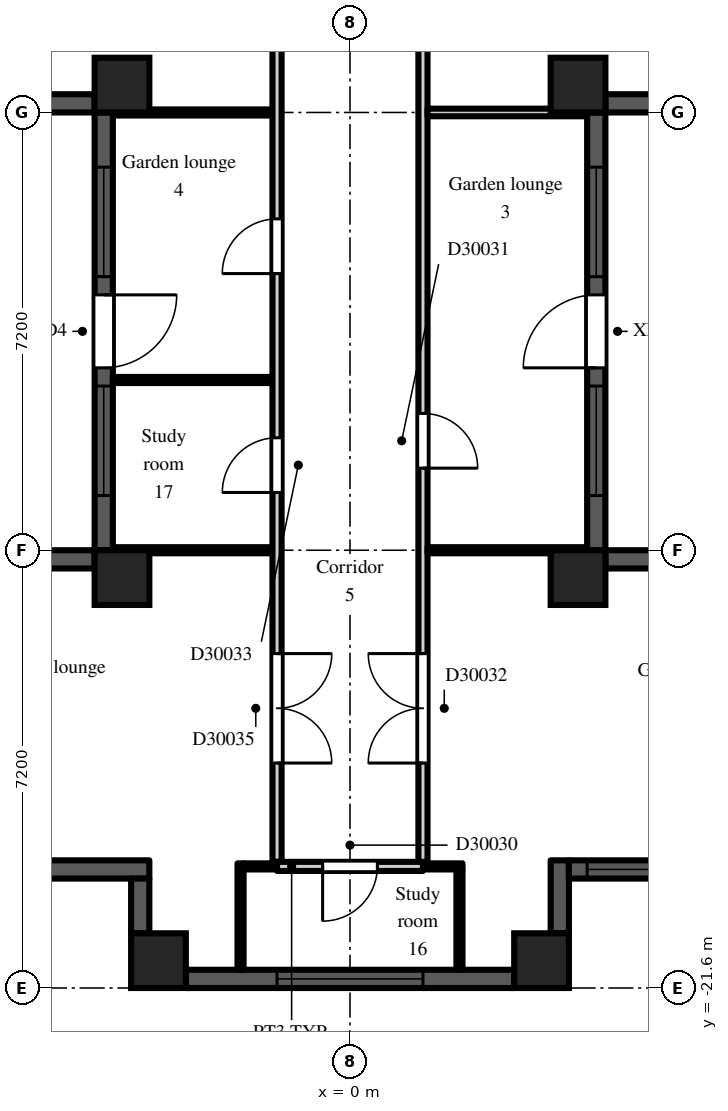
"""IFC4 building model, lengths in metres.
Left out: names, types, materials, properties, quantities, classifications, styles, units other than length and angle.
Written with IfcOpenShell. Run it as: python <this file> out.ifc"""

import sys

from ifc_helpers import new_model, si_unit, direction, frame, frame_2d, origin, origin_2d, place, context, subcontext, project, spatial, rectangle, extrude, element, fill, save


model = new_model("IFC4")
c1 = context("Model", 3, precision=1e-05, world=origin(), true_north=direction((0.0, 1.0)))
c2 = subcontext(c1, "Body", "Model", "MODEL_VIEW")
j1 = project(units=[si_unit("LENGTHUNIT", "METRE"), si_unit("PLANEANGLEUNIT", "RADIAN")], contexts=[c1])
p1 = place(None, origin())
s1 = spatial("IfcSite", under=j1, at=p1, CompositionType="ELEMENT")
p2 = place(p1, origin())
s2 = spatial("IfcBuilding", under=s1, at=p2, CompositionType="ELEMENT")
p3 = place(p2, frame((0.0, 0.0, 207.9)))
s3 = spatial("IfcBuildingStorey", under=s2, at=p3, CompositionType="ELEMENT", Elevation=207.9)
for number, where, z_axis, x_axis in (
    (1, (-3.75, -14.85, 0.0), (0.0, 0.0, 1.0), (1.0, 0.0, 0.0)),
    (2, (-3.75, -6.75, 0.0), (0.0, 0.0, 1.0), (1.0, 0.0, 0.0)),
    (3, (-3.15, -21.15, 0.0), (0.0, 0.0, 1.0), (1.0, 0.0, 0.0)),
    (4, (3.15, -21.15, 0.0), (0.0, 0.0, 1.0), (1.0, 0.0, 0.0)),
    (5, (3.75, -14.85, 0.0), (0.0, 0.0, 1.0), (1.0, 0.0, 0.0)),
    (6, (3.75, -6.75, 0.0), (0.0, 0.0, 1.0), (1.0, 0.0, 0.0)),
):
    element("IfcColumn", number, at=place(p3, frame(where, z_axis=z_axis, x_axis=x_axis)), inside=s3, PredefinedType="COLUMN", context=c2, shape_type="SweptSolid", body=[
        extrude(rectangle(XDim=0.9, YDim=0.9, at=origin_2d()), origin(), (0.0, 0.0, 1.0), 3.0),
    ])
p4 = place(p3, frame((-7.2, -7.05, 0.0), z_axis=(0.0, 0.0, 1.0), x_axis=(1.0, 0.0, 0.0)))
e7 = element("IfcWall", 7, at=p4, inside=s3, PredefinedType="SOLIDWALL", context=c2, shape_type="SweptSolid", body=[
    extrude(rectangle(XDim=3.0, YDim=0.3, at=frame_2d((1.5, 0.0))), origin(), (0.0, 0.0, 1.0), 2.3),
])
p5 = place(p3, frame((-4.05, -7.2, 0.0), z_axis=(0.0, 0.0, 1.0), x_axis=(0.0, -1.0, 0.0)))
e8 = element("IfcWall", 8, at=p5, inside=s3, PredefinedType="SOLIDWALL", context=c2, shape_type="SweptSolid", body=[
    extrude(rectangle(XDim=7.2, YDim=0.3, at=frame_2d((3.6, 0.0))), origin(), (0.0, 0.0, 1.0), 2.3),
])
p6 = place(p5, frame((3.0, 0.0, 0.0)))
e9 = element("IfcOpeningElement", 9, at=p6, cuts=e8, PredefinedType="OPENING", context=c2, shape_type="SweptSolid", body=[
    extrude(rectangle(XDim=1.2, YDim=2.05, at=frame_2d((0.6, 1.025))), frame((0.0, 0.16, 0.0), z_axis=(0.0, -1.0, 0.0), x_axis=(1.0, 0.0, 0.0)), (0.0, 0.0, 1.0), 0.32),
])
p7 = place(p5, frame((0.9, 0.0, 0.2)))
e10 = element("IfcOpeningElement", 10, at=p7, cuts=e8, PredefinedType="OPENING", context=c2, shape_type="SweptSolid", body=[
    extrude(rectangle(XDim=1.8, YDim=1.85, at=frame_2d((0.9, 0.925))), frame((0.0, 0.16, 0.0), z_axis=(0.0, -1.0, 0.0), x_axis=(1.0, 0.0, 0.0)), (0.0, 0.0, 1.0), 0.32),
])
p8 = place(p5, frame((4.5, 0.0, 0.2)))
e11 = element("IfcOpeningElement", 11, at=p8, cuts=e8, PredefinedType="OPENING", context=c2, shape_type="SweptSolid", body=[
    extrude(rectangle(XDim=1.8, YDim=1.85, at=frame_2d((0.9, 0.925))), frame((0.0, 0.16, 0.0), z_axis=(0.0, -1.0, 0.0), x_axis=(1.0, 0.0, 0.0)), (0.0, 0.0, 1.0), 0.32),
])
p9 = place(p3, frame((-4.2, -14.55, 0.0), z_axis=(0.0, 0.0, 1.0), x_axis=(-1.0, 0.0, 0.0)))
e12 = element("IfcWall", 12, at=p9, inside=s3, PredefinedType="SOLIDWALL", context=c2, shape_type="SweptSolid", body=[
    extrude(rectangle(XDim=2.1, YDim=0.3, at=frame_2d((1.05, 0.0))), origin(), (0.0, 0.0, 1.0), 2.3),
])
p10 = place(p3, frame((-5.1, -19.65, 0.0), z_axis=(0.0, 0.0, 1.0), x_axis=(1.0, 0.0, 0.0)))
e13 = element("IfcWall", 13, at=p10, inside=s3, PredefinedType="SOLIDWALL", context=c2, shape_type="SweptSolid", body=[
    extrude(rectangle(XDim=1.8, YDim=0.3, at=frame_2d((0.9, 0.0))), origin(), (0.0, 0.0, 1.0), 2.6),
])
p11 = place(p3, frame((-3.45, -19.8, 0.0), z_axis=(0.0, 0.0, 1.0), x_axis=(0.0, -1.0, 0.0)))
e14 = element("IfcWall", 14, at=p11, inside=s3, PredefinedType="SOLIDWALL", context=c2, shape_type="SweptSolid", body=[
    extrude(rectangle(XDim=0.9, YDim=0.3, at=frame_2d((0.45, 0.0))), origin(), (0.0, 0.0, 1.0), 2.6),
])
p12 = place(p3, frame((-2.7, -21.45, 0.0), z_axis=(0.0, 0.0, 1.0), x_axis=(1.0, 0.0, 0.0)))
e15 = element("IfcWall", 15, at=p12, inside=s3, PredefinedType="SOLIDWALL", context=c2, shape_type="SweptSolid", body=[
    extrude(rectangle(XDim=5.4, YDim=0.3, at=frame_2d((2.7, 0.0))), origin(), (0.0, 0.0, 1.0), 2.3),
])
p13 = place(p12, frame((1.5, 0.0, 0.2)))
e16 = element("IfcOpeningElement", 16, at=p13, cuts=e15, PredefinedType="OPENING", context=c2, shape_type="SweptSolid", body=[
    extrude(rectangle(XDim=2.4, YDim=1.85, at=frame_2d((1.2, 0.925))), frame((0.0, 0.16, 0.0), z_axis=(0.0, -1.0, 0.0), x_axis=(1.0, 0.0, 0.0)), (0.0, 0.0, 1.0), 0.32),
])
p14 = place(p3, frame((3.45, -20.7, 0.0), z_axis=(0.0, 0.0, 1.0), x_axis=(0.0, 1.0, 0.0)))
e17 = element("IfcWall", 17, at=p14, inside=s3, PredefinedType="SOLIDWALL", context=c2, shape_type="SweptSolid", body=[
    extrude(rectangle(XDim=1.2, YDim=0.3, at=frame_2d((0.6, 0.0))), origin(), (0.0, 0.0, 1.0), 2.6),
])
p15 = place(p3, frame((3.6, -19.65, 0.0), z_axis=(0.0, 0.0, 1.0), x_axis=(1.0, 0.0, 0.0)))
e18 = element("IfcWall", 18, at=p15, inside=s3, PredefinedType="SOLIDWALL", context=c2, shape_type="SweptSolid", body=[
    extrude(rectangle(XDim=1.8, YDim=0.3, at=frame_2d((0.9, 0.0))), origin(), (0.0, 0.0, 1.0), 2.6),
])
p16 = place(p15, frame((0.3, 0.0, 0.2)))
e19 = element("IfcOpeningElement", 19, at=p16, cuts=e18, PredefinedType="OPENING", context=c2, shape_type="SweptSolid", body=[
    extrude(rectangle(XDim=1.2, YDim=1.85, at=frame_2d((0.6, 0.925))), frame((0.0, 0.16, 0.0), z_axis=(0.0, -1.0, 0.0), x_axis=(1.0, 0.0, 0.0)), (0.0, 0.0, 1.0), 0.32),
])
p17 = place(p3, frame((6.3, -14.55, 0.0), z_axis=(0.0, 0.0, 1.0), x_axis=(-1.0, 0.0, 0.0)))
e20 = element("IfcWall", 20, at=p17, inside=s3, PredefinedType="SOLIDWALL", context=c2, shape_type="SweptSolid", body=[
    extrude(rectangle(XDim=2.1, YDim=0.3, at=frame_2d((1.05, 0.0))), origin(), (0.0, 0.0, 1.0), 2.3),
])
p18 = place(p3, frame((4.05, -14.4, 0.0), z_axis=(0.0, 0.0, 1.0), x_axis=(0.0, 1.0, 0.0)))
e21 = element("IfcWall", 21, at=p18, inside=s3, PredefinedType="SOLIDWALL", context=c2, shape_type="SweptSolid", body=[
    extrude(rectangle(XDim=7.2, YDim=0.3, at=frame_2d((3.6, 0.0))), origin(), (0.0, 0.0, 1.0), 2.3),
])
p19 = place(p18, frame((3.0, 0.0, 0.0)))
e22 = element("IfcOpeningElement", 22, at=p19, cuts=e21, PredefinedType="OPENING", context=c2, shape_type="SweptSolid", body=[
    extrude(rectangle(XDim=1.2, YDim=2.05, at=frame_2d((0.6, 1.025))), frame((0.0, 0.16, 0.0), z_axis=(0.0, -1.0, 0.0), x_axis=(1.0, 0.0, 0.0)), (0.0, 0.0, 1.0), 0.32),
])
p20 = place(p18, frame((0.9, 0.0, 0.2)))
e23 = element("IfcOpeningElement", 23, at=p20, cuts=e21, PredefinedType="OPENING", context=c2, shape_type="SweptSolid", body=[
    extrude(rectangle(XDim=1.8, YDim=1.85, at=frame_2d((0.9, 0.925))), frame((0.0, 0.16, 0.0), z_axis=(0.0, -1.0, 0.0), x_axis=(1.0, 0.0, 0.0)), (0.0, 0.0, 1.0), 0.32),
])
p21 = place(p18, frame((4.5, 0.0, 0.2)))
e24 = element("IfcOpeningElement", 24, at=p21, cuts=e21, PredefinedType="OPENING", context=c2, shape_type="SweptSolid", body=[
    extrude(rectangle(XDim=1.8, YDim=1.85, at=frame_2d((0.9, 0.925))), frame((0.0, 0.16, 0.0), z_axis=(0.0, -1.0, 0.0), x_axis=(1.0, 0.0, 0.0)), (0.0, 0.0, 1.0), 0.32),
])
p22 = place(p3, frame((4.2, -7.05, 0.0), z_axis=(0.0, 0.0, 1.0), x_axis=(1.0, 0.0, 0.0)))
e25 = element("IfcWall", 25, at=p22, inside=s3, PredefinedType="SOLIDWALL", context=c2, shape_type="SweptSolid", body=[
    extrude(rectangle(XDim=3.0, YDim=0.3, at=frame_2d((1.5, 0.0))), origin(), (0.0, 0.0, 1.0), 2.3),
])
for number, where, z_axis, x_axis in (
    (26, (-3.9, -14.4, 0.0), (0.0, 0.0, 1.0), (1.0, 0.0, 0.0)),
    (27, (-3.9, -11.6, 0.0), (0.0, 0.0, 1.0), (1.0, 0.0, 0.0)),
    (28, (-3.9, -7.2, 0.0), (0.0, 0.0, 1.0), (1.0, 0.0, 0.0)),
):
    element("IfcWall", number, at=place(p3, frame(where, z_axis=z_axis, x_axis=x_axis)), inside=s3, PredefinedType="PARTITIONING", context=c2, shape_type="SweptSolid", body=[
        extrude(rectangle(XDim=2.625, YDim=0.1, at=frame_2d((1.312, 0.0))), origin(), (0.0, 0.0, 1.0), 2.6),
    ])
p23 = place(p3, frame((-1.8, -21.3, 0.0), z_axis=(0.0, 0.0, 1.0), x_axis=(0.0, 1.0, 0.0)))
e29 = element("IfcWall", 29, at=p23, inside=s3, PredefinedType="PARTITIONING", context=c2, shape_type="SweptSolid", body=[
    extrude(rectangle(XDim=1.75, YDim=0.1, at=frame_2d((0.875, 0.0))), origin(), (0.0, 0.0, 1.0), 2.6),
])
p24 = place(p3, frame((-1.75, -19.6, 0.0), z_axis=(0.0, 0.0, 1.0), x_axis=(1.0, 0.0, 0.0)))
e30 = element("IfcWall", 30, at=p24, inside=s3, PredefinedType="PARTITIONING", context=c2, shape_type="SweptSolid", body=[
    extrude(rectangle(XDim=0.55, YDim=0.1, at=frame_2d((0.275, 0.0))), origin(), (0.0, 0.0, 1.0), 2.6),
])
p25 = place(p3, frame((-1.2, -19.525, 0.0), z_axis=(0.0, 0.0, 1.0), x_axis=(0.0, 1.0, 0.0)))
e31 = element("IfcWall", 31, at=p25, inside=s3, PredefinedType="PARTITIONING", context=c2, shape_type="SweptSolid", body=[
    extrude(rectangle(XDim=18.25, YDim=0.15, at=frame_2d((9.125, 0.0))), origin(), (0.0, 0.0, 1.0), 2.6),
])
p26 = place(p25, frame((6.075, 0.0, 0.0)))
e32 = element("IfcOpeningElement", 32, at=p26, cuts=e31, PredefinedType="OPENING", context=c2, shape_type="SweptSolid", body=[
    extrude(rectangle(XDim=0.9, YDim=2.1, at=frame_2d((0.45, 1.05))), frame((0.0, 0.085, 0.0), z_axis=(0.0, -1.0, 0.0), x_axis=(1.0, 0.0, 0.0)), (0.0, 0.0, 1.0), 0.17),
])
p27 = place(p25, frame((9.675, 0.0, 0.0)))
e33 = element("IfcOpeningElement", 33, at=p27, cuts=e31, PredefinedType="OPENING", context=c2, shape_type="SweptSolid", body=[
    extrude(rectangle(XDim=0.9, YDim=2.1, at=frame_2d((0.45, 1.05))), frame((0.0, 0.085, 0.0), z_axis=(0.0, -1.0, 0.0), x_axis=(1.0, 0.0, 0.0)), (0.0, 0.0, 1.0), 0.17),
])
p28 = place(p25, frame((1.625, 0.0, 0.0)))
e34 = element("IfcOpeningElement", 34, at=p28, cuts=e31, PredefinedType="OPENING", context=c2, shape_type="SweptSolid", body=[
    extrude(rectangle(XDim=1.8, YDim=2.1, at=frame_2d((0.9, 1.05))), frame((0.0, 0.085, 0.0), z_axis=(0.0, -1.0, 0.0), x_axis=(1.0, 0.0, 0.0)), (0.0, 0.0, 1.0), 0.17),
])
p29 = place(p3, frame((-1.2, -19.6, 0.0), z_axis=(0.0, 0.0, 1.0), x_axis=(1.0, 0.0, 0.0)))
e35 = element("IfcWall", 35, at=p29, inside=s3, PredefinedType="PARTITIONING", context=c2, shape_type="SweptSolid", body=[
    extrude(rectangle(XDim=2.4, YDim=0.15, at=frame_2d((1.2, 0.0))), origin(), (0.0, 0.0, 1.0), 2.6),
])
p30 = place(p29, frame((0.75, 0.0, 0.0)))
e36 = element("IfcOpeningElement", 36, at=p30, cuts=e35, PredefinedType="OPENING", context=c2, shape_type="SweptSolid", body=[
    extrude(rectangle(XDim=0.9, YDim=2.1, at=frame_2d((0.45, 1.05))), frame((0.0, 0.085, 0.0), z_axis=(0.0, -1.0, 0.0), x_axis=(1.0, 0.0, 0.0)), (0.0, 0.0, 1.0), 0.17),
])
p31 = place(p3, frame((1.2, -19.525, 0.0), z_axis=(0.0, 0.0, 1.0), x_axis=(0.0, 1.0, 0.0)))
e37 = element("IfcWall", 37, at=p31, inside=s3, PredefinedType="PARTITIONING", context=c2, shape_type="SweptSolid", body=[
    extrude(rectangle(XDim=18.4, YDim=0.15, at=frame_2d((9.2, 0.0))), origin(), (0.0, 0.0, 1.0), 2.6),
])
p32 = place(p31, frame((16.675, 0.0, 0.0)))
e38 = element("IfcOpeningElement", 38, at=p32, cuts=e37, PredefinedType="OPENING", context=c2, shape_type="SweptSolid", body=[
    extrude(rectangle(XDim=0.9, YDim=2.1, at=frame_2d((0.45, 1.05))), frame((0.0, 0.085, 0.0), z_axis=(0.0, -1.0, 0.0), x_axis=(1.0, 0.0, 0.0)), (0.0, 0.0, 1.0), 0.17),
])
p33 = place(p31, frame((13.675, 0.0, 0.0)))
e39 = element("IfcOpeningElement", 39, at=p33, cuts=e37, PredefinedType="OPENING", context=c2, shape_type="SweptSolid", body=[
    extrude(rectangle(XDim=0.9, YDim=2.1, at=frame_2d((0.45, 1.05))), frame((0.0, 0.085, 0.0), z_axis=(0.0, -1.0, 0.0), x_axis=(1.0, 0.0, 0.0)), (0.0, 0.0, 1.0), 0.17),
])
p34 = place(p31, frame((6.475, 0.0, 0.0)))
e40 = element("IfcOpeningElement", 40, at=p34, cuts=e37, PredefinedType="OPENING", context=c2, shape_type="SweptSolid", body=[
    extrude(rectangle(XDim=0.9, YDim=2.1, at=frame_2d((0.45, 1.05))), frame((0.0, 0.085, 0.0), z_axis=(0.0, -1.0, 0.0), x_axis=(1.0, 0.0, 0.0)), (0.0, 0.0, 1.0), 0.17),
])
p35 = place(p31, frame((1.625, 0.0, 0.0)))
e41 = element("IfcOpeningElement", 41, at=p35, cuts=e37, PredefinedType="OPENING", context=c2, shape_type="SweptSolid", body=[
    extrude(rectangle(XDim=1.8, YDim=2.1, at=frame_2d((0.9, 1.05))), frame((0.0, 0.085, 0.0), z_axis=(0.0, -1.0, 0.0), x_axis=(1.0, 0.0, 0.0)), (0.0, 0.0, 1.0), 0.17),
])
p36 = place(p3, frame((1.2, -19.6, 0.0), z_axis=(0.0, 0.0, 1.0), x_axis=(1.0, 0.0, 0.0)))
e42 = element("IfcWall", 42, at=p36, inside=s3, PredefinedType="PARTITIONING", context=c2, shape_type="SweptSolid", body=[
    extrude(rectangle(XDim=0.65, YDim=0.1, at=frame_2d((0.325, 0.0))), origin(), (0.0, 0.0, 1.0), 2.6),
])
p37 = place(p3, frame((1.275, -14.4, 0.0), z_axis=(0.0, 0.0, 1.0), x_axis=(1.0, 0.0, 0.0)))
e43 = element("IfcWall", 43, at=p37, inside=s3, PredefinedType="PARTITIONING", context=c2, shape_type="SweptSolid", body=[
    extrude(rectangle(XDim=2.625, YDim=0.1, at=frame_2d((1.312, 0.0))), origin(), (0.0, 0.0, 1.0), 2.6),
])
p38 = place(p3, frame((1.275, -7.2, 0.0), z_axis=(0.0, 0.0, 1.0), x_axis=(1.0, 0.0, 0.0)))
e44 = element("IfcWall", 44, at=p38, inside=s3, PredefinedType="PARTITIONING", context=c2, shape_type="SweptSolid", body=[
    extrude(rectangle(XDim=2.625, YDim=0.125, at=frame_2d((1.312, 0.0))), origin(), (0.0, 0.0, 1.0), 2.6),
])
p39 = place(p3, frame((1.8, -21.3, 0.0), z_axis=(0.0, 0.0, 1.0), x_axis=(0.0, 1.0, 0.0)))
e45 = element("IfcWall", 45, at=p39, inside=s3, PredefinedType="PARTITIONING", context=c2, shape_type="SweptSolid", body=[
    extrude(rectangle(XDim=1.65, YDim=0.1, at=frame_2d((0.825, 0.0))), origin(), (0.0, 0.0, 1.0), 2.6),
])
p40 = place(p6, origin())
e46 = element("IfcDoor", 46, at=p40, inside=s3, OperationType="SINGLE_SWING_LEFT", PredefinedType="DOOR", context=c2, shape_type="SweptSolid", body=[
    extrude(rectangle(XDim=1.2, YDim=2.05, at=frame_2d((0.6, 1.025))), frame((0.0, 0.025, 0.0), z_axis=(0.0, -1.0, 0.0), x_axis=(1.0, 0.0, 0.0)), (0.0, 0.0, 1.0), 0.05),
])
fill(e9, e46)
p41 = place(p7, origin())
e47 = element("IfcWindow", 47, at=p41, inside=s3, PartitioningType="SINGLE_PANEL", PredefinedType="WINDOW", context=c2, shape_type="SweptSolid", body=[
    extrude(rectangle(XDim=1.8, YDim=1.85, at=frame_2d((0.9, 0.925))), frame((0.0, 0.03, 0.0), z_axis=(0.0, -1.0, 0.0), x_axis=(1.0, 0.0, 0.0)), (0.0, 0.0, 1.0), 0.06),
])
fill(e10, e47)
p42 = place(p8, origin())
e48 = element("IfcWindow", 48, at=p42, inside=s3, PartitioningType="SINGLE_PANEL", PredefinedType="WINDOW", context=c2, shape_type="SweptSolid", body=[
    extrude(rectangle(XDim=1.8, YDim=1.85, at=frame_2d((0.9, 0.925))), frame((0.0, 0.03, 0.0), z_axis=(0.0, -1.0, 0.0), x_axis=(1.0, 0.0, 0.0)), (0.0, 0.0, 1.0), 0.06),
])
fill(e11, e48)
p43 = place(p13, origin())
e49 = element("IfcWindow", 49, at=p43, inside=s3, PartitioningType="SINGLE_PANEL", PredefinedType="WINDOW", context=c2, shape_type="SweptSolid", body=[
    extrude(rectangle(XDim=2.4, YDim=1.85, at=frame_2d((1.2, 0.925))), frame((0.0, 0.03, 0.0), z_axis=(0.0, -1.0, 0.0), x_axis=(1.0, 0.0, 0.0)), (0.0, 0.0, 1.0), 0.06),
])
fill(e16, e49)
p44 = place(p16, origin())
e50 = element("IfcWindow", 50, at=p44, inside=s3, PartitioningType="SINGLE_PANEL", PredefinedType="WINDOW", context=c2, shape_type="SweptSolid", body=[
    extrude(rectangle(XDim=1.2, YDim=1.85, at=frame_2d((0.6, 0.925))), frame((0.0, 0.03, 0.0), z_axis=(0.0, -1.0, 0.0), x_axis=(1.0, 0.0, 0.0)), (0.0, 0.0, 1.0), 0.06),
])
fill(e19, e50)
p45 = place(p19, origin())
e51 = element("IfcDoor", 51, at=p45, inside=s3, OperationType="SINGLE_SWING_LEFT", PredefinedType="DOOR", context=c2, shape_type="SweptSolid", body=[
    extrude(rectangle(XDim=1.2, YDim=2.05, at=frame_2d((0.6, 1.025))), frame((0.0, 0.025, 0.0), z_axis=(0.0, -1.0, 0.0), x_axis=(1.0, 0.0, 0.0)), (0.0, 0.0, 1.0), 0.05),
])
fill(e22, e51)
p46 = place(p20, origin())
e52 = element("IfcWindow", 52, at=p46, inside=s3, PartitioningType="SINGLE_PANEL", PredefinedType="WINDOW", context=c2, shape_type="SweptSolid", body=[
    extrude(rectangle(XDim=1.8, YDim=1.85, at=frame_2d((0.9, 0.925))), frame((0.0, 0.03, 0.0), z_axis=(0.0, -1.0, 0.0), x_axis=(1.0, 0.0, 0.0)), (0.0, 0.0, 1.0), 0.06),
])
fill(e23, e52)
p47 = place(p21, origin())
e53 = element("IfcWindow", 53, at=p47, inside=s3, PartitioningType="SINGLE_PANEL", PredefinedType="WINDOW", context=c2, shape_type="SweptSolid", body=[
    extrude(rectangle(XDim=1.8, YDim=1.85, at=frame_2d((0.9, 0.925))), frame((0.0, 0.03, 0.0), z_axis=(0.0, -1.0, 0.0), x_axis=(1.0, 0.0, 0.0)), (0.0, 0.0, 1.0), 0.06),
])
fill(e24, e53)
p48 = place(p30, frame((0.9, 0.0, 0.0), z_axis=(0.0, 0.0, 1.0), x_axis=(-1.0, 0.0, 0.0)))
e54 = element("IfcDoor", 54, at=p48, inside=s3, OperationType="SINGLE_SWING_RIGHT", PredefinedType="DOOR", context=c2, shape_type="SweptSolid", body=[
    extrude(rectangle(XDim=0.9, YDim=2.1, at=frame_2d((0.45, 1.05))), frame((0.0, 0.025, 0.0), z_axis=(0.0, -1.0, 0.0), x_axis=(1.0, 0.0, 0.0)), (0.0, 0.0, 1.0), 0.05),
])
fill(e36, e54)
p49 = place(p34, frame((0.9, 0.0, 0.0), z_axis=(0.0, 0.0, 1.0), x_axis=(-1.0, 0.0, 0.0)))
e55 = element("IfcDoor", 55, at=p49, inside=s3, OperationType="SINGLE_SWING_RIGHT", PredefinedType="DOOR", context=c2, shape_type="SweptSolid", body=[
    extrude(rectangle(XDim=0.9, YDim=2.1, at=frame_2d((0.45, 1.05))), frame((0.0, 0.025, 0.0), z_axis=(0.0, -1.0, 0.0), x_axis=(1.0, 0.0, 0.0)), (0.0, 0.0, 1.0), 0.05),
])
fill(e40, e55)
p50 = place(p35, origin())
e56 = element("IfcDoor", 56, at=p50, inside=s3, OperationType="DOUBLE_DOOR_DOUBLE_SWING", PredefinedType="DOOR", context=c2, shape_type="SweptSolid", body=[
    extrude(rectangle(XDim=1.8, YDim=2.1, at=frame_2d((0.9, 1.05))), frame((0.0, 0.025, 0.0), z_axis=(0.0, -1.0, 0.0), x_axis=(1.0, 0.0, 0.0)), (0.0, 0.0, 1.0), 0.05),
])
fill(e41, e56)
p51 = place(p26, origin())
e57 = element("IfcDoor", 57, at=p51, inside=s3, OperationType="SINGLE_SWING_LEFT", PredefinedType="DOOR", context=c2, shape_type="SweptSolid", body=[
    extrude(rectangle(XDim=0.9, YDim=2.1, at=frame_2d((0.45, 1.05))), frame((0.0, 0.025, 0.0), z_axis=(0.0, -1.0, 0.0), x_axis=(1.0, 0.0, 0.0)), (0.0, 0.0, 1.0), 0.05),
])
fill(e32, e57)
p52 = place(p27, origin())
e58 = element("IfcDoor", 58, at=p52, inside=s3, OperationType="SINGLE_SWING_LEFT", PredefinedType="DOOR", context=c2, shape_type="SweptSolid", body=[
    extrude(rectangle(XDim=0.9, YDim=2.1, at=frame_2d((0.45, 1.05))), frame((0.0, 0.025, 0.0), z_axis=(0.0, -1.0, 0.0), x_axis=(1.0, 0.0, 0.0)), (0.0, 0.0, 1.0), 0.05),
])
fill(e33, e58)
p53 = place(p28, frame((1.8, 0.0, 0.0), z_axis=(0.0, 0.0, 1.0), x_axis=(-1.0, 0.0, 0.0)))
e59 = element("IfcDoor", 59, at=p53, inside=s3, OperationType="DOUBLE_DOOR_DOUBLE_SWING", PredefinedType="DOOR", context=c2, shape_type="SweptSolid", body=[
    extrude(rectangle(XDim=1.8, YDim=2.1, at=frame_2d((0.9, 1.05))), frame((0.0, 0.025, 0.0), z_axis=(0.0, -1.0, 0.0), x_axis=(1.0, 0.0, 0.0)), (0.0, 0.0, 1.0), 0.05),
])
fill(e34, e59)
save(model, sys.argv[1])
